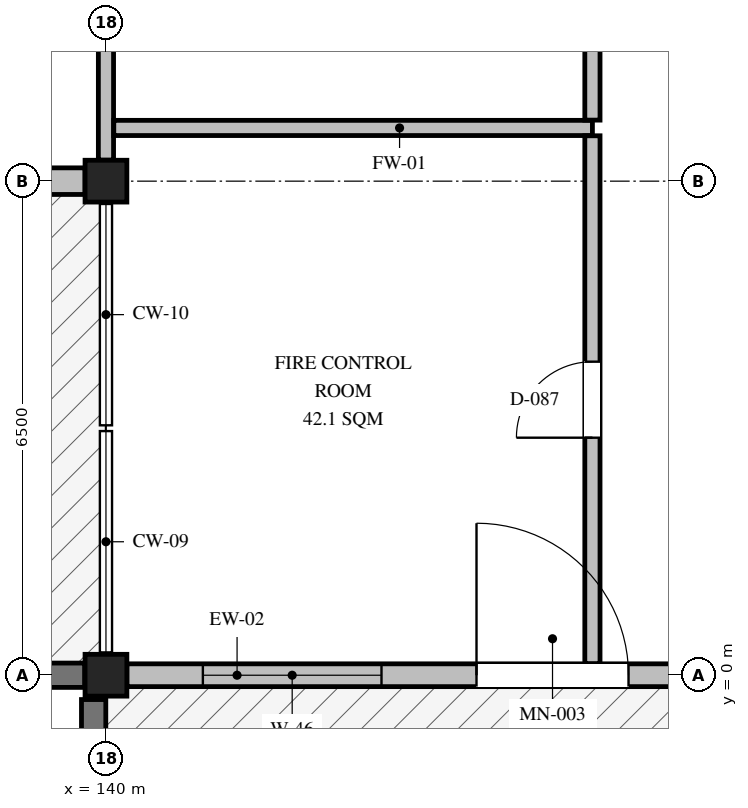
"""IFC4 building model, lengths in metres.
Left out: names, types, materials, properties, quantities, classifications, styles, units other than length and angle.
Written with IfcOpenShell. Run it as: python <this file> out.ifc"""

import sys

from ifc_helpers import new_model, si_unit, direction, frame, frame_2d, origin, origin_2d, place, context, subcontext, project, spatial, rectangle, hollow_rectangle, extrude, element, fill, save


model = new_model("IFC4")
c1 = context("Model", 3, precision=1e-05, world=origin(), true_north=direction((0.0, 1.0)))
c2 = subcontext(c1, "Body", "Model", "MODEL_VIEW")
j1 = project(units=[si_unit("LENGTHUNIT", "METRE"), si_unit("PLANEANGLEUNIT", "RADIAN")], contexts=[c1])
p1 = place(None, origin())
s1 = spatial("IfcSite", under=j1, at=p1, CompositionType="ELEMENT")
p2 = place(p1, origin())
s2 = spatial("IfcBuilding", under=s1, at=p2, CompositionType="ELEMENT")
p3 = place(p2, frame((0.0, 0.0, 0.45)))
s3 = spatial("IfcBuildingStorey", under=s2, at=p3, CompositionType="ELEMENT", Elevation=0.45)
for number, where, z_axis, x_axis in (
    (1, (140.0, 0.0, -0.45), (0.0, 0.0, 1.0), (1.0, 0.0, 0.0)),
    (2, (140.0, 6.5, -0.45), (0.0, 0.0, 1.0), (1.0, 0.0, 0.0)),
):
    element("IfcColumn", number, at=place(p3, frame(where, z_axis=z_axis, x_axis=x_axis)), inside=s3, PredefinedType="COLUMN", context=c2, shape_type="SweptSolid", body=[
        extrude(hollow_rectangle(XDim=0.55, YDim=0.55, WallThickness=0.026, at=origin_2d()), origin(), (0.0, 0.0, 1.0), 5.85),
    ])
p4 = place(p3, frame((139.838, -2.722, -1.0), z_axis=(0.0, 0.0, 1.0), x_axis=(0.0, 1.0, 0.0)))
e3 = element("IfcWall", 3, at=p4, inside=s3, PredefinedType="SOLIDWALL", context=c2, shape_type="SweptSolid", body=[
    extrude(rectangle(XDim=2.402, YDim=0.32, at=frame_2d((1.201, 0.0))), origin(), (0.0, 0.0, 1.0), 1.0),
])
p5 = place(p3, frame((132.21, 0.0, -0.45), z_axis=(0.0, 0.0, 1.0), x_axis=(1.0, 0.0, 0.0)))
e4 = element("IfcWall", 4, at=p5, inside=s3, PredefinedType="SOLIDWALL", context=c2, shape_type="SweptSolid", body=[
    extrude(rectangle(XDim=7.51, YDim=0.32, at=frame_2d((3.755, 0.0))), origin(), (0.0, 0.0, 1.0), 0.45),
])
p6 = place(p3, frame((132.275, 6.5, 0.0), z_axis=(0.0, 0.0, 1.0), x_axis=(1.0, 0.0, 0.0)))
e5 = element("IfcWall", 5, at=p6, inside=s3, PredefinedType="SOLIDWALL", context=c2, shape_type="SweptSolid", body=[
    extrude(rectangle(XDim=7.45, YDim=0.35, at=frame_2d((3.725, 0.0))), origin(), (0.0, 0.0, 1.0), 4.694),
])
p7 = place(p6, frame((1.725, 0.0, 0.0)))
e6 = element("IfcOpeningElement", 6, at=p7, cuts=e5, PredefinedType="OPENING", context=c2, shape_type="SweptSolid", body=[
    extrude(rectangle(XDim=4.0, YDim=4.4, at=frame_2d((2.0, 2.2))), frame((0.0, 0.185, 0.0), z_axis=(0.0, -1.0, 0.0), x_axis=(1.0, 0.0, 0.0)), (0.0, 0.0, 1.0), 0.37),
])
p8 = place(p3, frame((140.275, 0.0, 0.0), z_axis=(0.0, 0.0, 1.0), x_axis=(1.0, 0.0, 0.0)))
e7 = element("IfcWall", 7, at=p8, inside=s3, PredefinedType="SOLIDWALL", context=c2, shape_type="SweptSolid", body=[
    extrude(rectangle(XDim=7.525, YDim=0.3, at=frame_2d((3.763, 0.0))), origin(), (0.0, 0.0, 1.0), 4.754),
])
p9 = place(p8, frame((4.6, 0.0, 0.0)))
e8 = element("IfcOpeningElement", 8, at=p9, cuts=e7, PredefinedType="OPENING", context=c2, shape_type="SweptSolid", body=[
    extrude(rectangle(XDim=2.0, YDim=2.5, at=frame_2d((1.0, 1.25))), frame((0.0, 0.16, 0.0), z_axis=(0.0, -1.0, 0.0), x_axis=(1.0, 0.0, 0.0)), (0.0, 0.0, 1.0), 0.32),
])
p10 = place(p8, frame((1.0, 0.0, 1.0)))
e9 = element("IfcOpeningElement", 9, at=p10, cuts=e7, PredefinedType="OPENING", context=c2, shape_type="SweptSolid", body=[
    extrude(rectangle(XDim=2.35, YDim=1.3, at=frame_2d((1.175, 0.65))), frame((0.0, 0.16, 0.0), z_axis=(0.0, -1.0, 0.0), x_axis=(1.0, 0.0, 0.0)), (0.0, 0.0, 1.0), 0.32),
])
p11 = place(p3, frame((140.0, 6.777, 0.0), z_axis=(0.0, 0.0, 1.0), x_axis=(0.0, 1.0, 0.0)))
e10 = element("IfcWall", 10, at=p11, inside=s3, PredefinedType="PARTITIONING", context=c2, shape_type="SweptSolid", body=[
    extrude(rectangle(XDim=7.446, YDim=0.2, at=frame_2d((3.723, 0.0))), origin(), (0.0, 0.0, 1.0), 4.694),
])
p12 = place(p3, frame((140.103, 7.2, 0.0), z_axis=(0.0, 0.0, 1.0), x_axis=(1.0, 0.0, 0.0)))
e11 = element("IfcWall", 11, at=p12, inside=s3, PredefinedType="PARTITIONING", context=c2, shape_type="SweptSolid", body=[
    extrude(rectangle(XDim=6.297, YDim=0.2, at=frame_2d((3.148, 0.0))), origin(), (0.0, 0.0, 1.0), 5.2),
])
p13 = place(p3, frame((146.4, 0.153, 0.0), z_axis=(0.0, 0.0, 1.0), x_axis=(0.0, 1.0, 0.0)))
e12 = element("IfcWall", 12, at=p13, inside=s3, PredefinedType="PARTITIONING", context=c2, shape_type="SweptSolid", body=[
    extrude(rectangle(XDim=6.944, YDim=0.2, at=frame_2d((3.472, 0.0))), origin(), (0.0, 0.0, 1.0), 4.95),
])
p14 = place(p13, frame((2.972, 0.0, 0.0)))
e13 = element("IfcOpeningElement", 13, at=p14, cuts=e12, PredefinedType="OPENING", context=c2, shape_type="SweptSolid", body=[
    extrude(rectangle(XDim=1.0, YDim=2.1, at=frame_2d((0.5, 1.05))), frame((0.0, 0.11, 0.0), z_axis=(0.0, -1.0, 0.0), x_axis=(1.0, 0.0, 0.0)), (0.0, 0.0, 1.0), 0.22),
])
p15 = place(p3, frame((146.4, 7.303, 0.0), z_axis=(0.0, 0.0, 1.0), x_axis=(0.0, 1.0, 0.0)))
e14 = element("IfcWall", 14, at=p15, inside=s3, PredefinedType="PARTITIONING", context=c2, shape_type="SweptSolid", body=[
    extrude(rectangle(XDim=14.994, YDim=0.2, at=frame_2d((7.497, 0.0))), origin(), (0.0, 0.0, 1.0), 4.95),
])
p16 = place(p15, frame((8.297, 0.0, 0.0)))
e15 = element("IfcOpeningElement", 15, at=p16, cuts=e14, PredefinedType="OPENING", context=c2, shape_type="SweptSolid", body=[
    extrude(rectangle(XDim=1.6, YDim=2.2, at=frame_2d((0.8, 1.1))), frame((0.0, 0.11, 0.0), z_axis=(0.0, -1.0, 0.0), x_axis=(1.0, 0.0, 0.0)), (0.0, 0.0, 1.0), 0.22),
])
p17 = place(p9, frame((2.0, 0.0, 0.0), z_axis=(0.0, 0.0, 1.0), x_axis=(-1.0, 0.0, 0.0)))
e16 = element("IfcDoor", 16, at=p17, inside=s3, OperationType="SINGLE_SWING_LEFT", PredefinedType="DOOR", context=c2, shape_type="SweptSolid", body=[
    extrude(rectangle(XDim=2.0, YDim=2.5, at=frame_2d((1.0, 1.25))), frame((0.0, 0.025, 0.0), z_axis=(0.0, -1.0, 0.0), x_axis=(1.0, 0.0, 0.0)), (0.0, 0.0, 1.0), 0.05),
])
fill(e8, e16)
p18 = place(p10, origin())
e17 = element("IfcWindow", 17, at=p18, inside=s3, PartitioningType="SINGLE_PANEL", PredefinedType="WINDOW", context=c2, shape_type="SweptSolid", body=[
    extrude(rectangle(XDim=2.35, YDim=1.3, at=frame_2d((1.175, 0.65))), frame((0.0, 0.03, 0.0), z_axis=(0.0, -1.0, 0.0), x_axis=(1.0, 0.0, 0.0)), (0.0, 0.0, 1.0), 0.06),
])
fill(e9, e17)
p19 = place(p14, origin())
e18 = element("IfcDoor", 18, at=p19, inside=s3, OperationType="SINGLE_SWING_LEFT", PredefinedType="DOOR", context=c2, shape_type="SweptSolid", body=[
    extrude(rectangle(XDim=1.0, YDim=2.1, at=frame_2d((0.5, 1.05))), frame((0.0, 0.025, 0.0), z_axis=(0.0, -1.0, 0.0), x_axis=(1.0, 0.0, 0.0)), (0.0, 0.0, 1.0), 0.05),
])
fill(e13, e18)
save(model, sys.argv[1])
